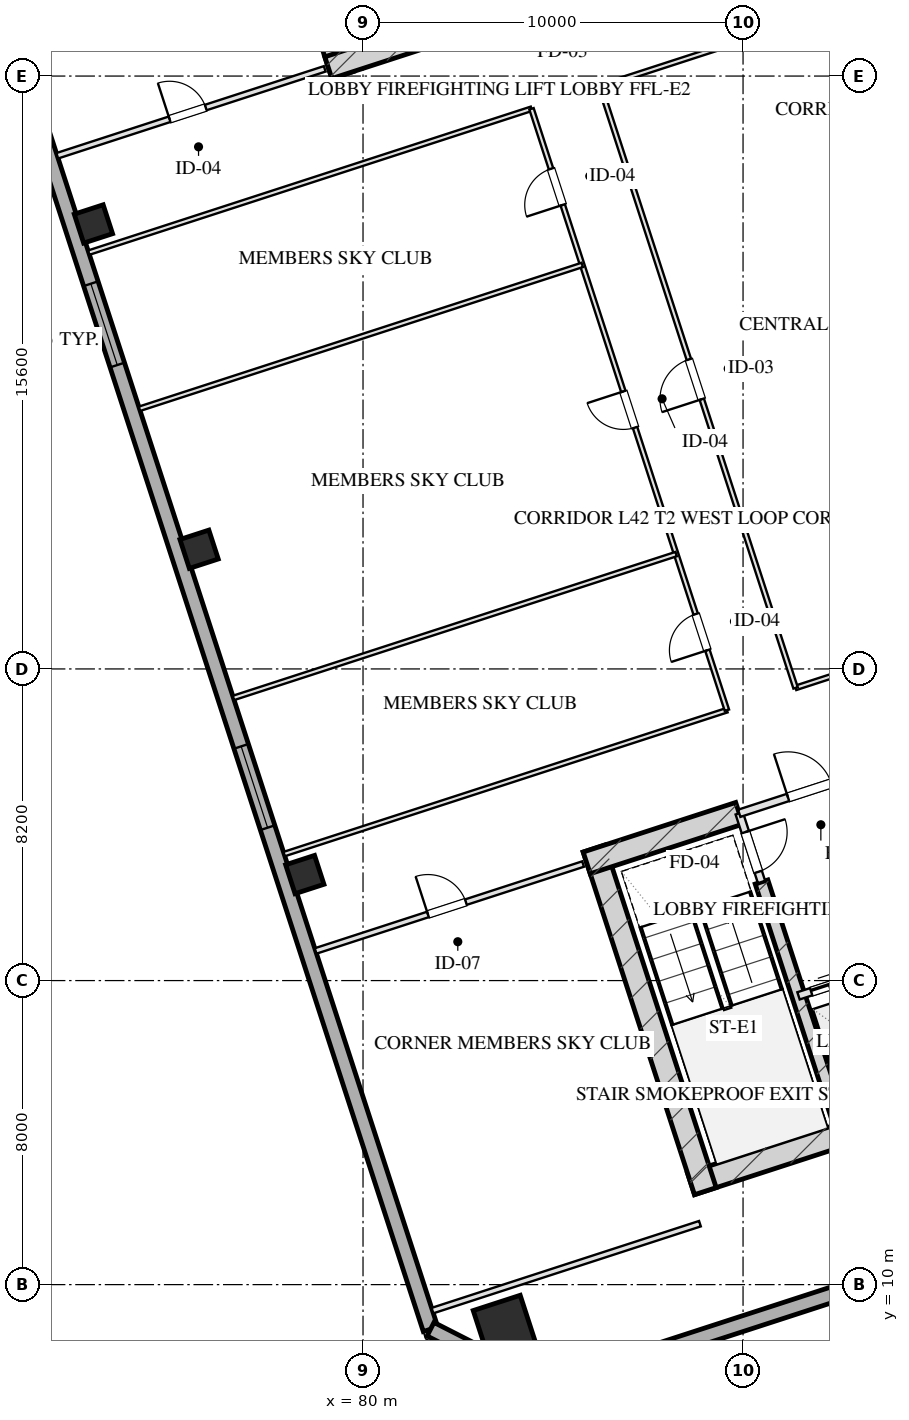
"""IFC4 building model, lengths in metres.
Left out: names, types, materials, properties, quantities, classifications, styles, units other than length and angle.
Written with IfcOpenShell. Run it as: python <this file> out.ifc"""

import sys

from ifc_helpers import new_model, si_unit, direction, frame, frame_2d, origin, origin_2d, place, context, subcontext, project, spatial, rectangle, hollow_rectangle, extrude, element, fill, save


model = new_model("IFC4")
c1 = context("Model", 3, precision=1e-05, world=origin(), true_north=direction((0.0, 1.0)))
c2 = subcontext(c1, "Body", "Model", "MODEL_VIEW")
j1 = project(units=[si_unit("LENGTHUNIT", "METRE"), si_unit("PLANEANGLEUNIT", "RADIAN")], contexts=[c1])
p1 = place(None, origin())
s1 = spatial("IfcSite", under=j1, at=p1, CompositionType="ELEMENT")
p2 = place(p1, origin())
s2 = spatial("IfcBuilding", under=s1, at=p2, CompositionType="ELEMENT")
p3 = place(p2, frame((0.0, 0.0, 159.85)))
s3 = spatial("IfcBuildingStorey", under=s2, at=p3, CompositionType="ELEMENT", Elevation=159.85)
p4 = place(p3, frame((88.63, 12.652, 0.0), z_axis=(0.0, 0.0, 1.0), x_axis=(0.95105714907, 0.309015046886, 0.0)))
e1 = element("IfcWall", 1, at=p4, inside=s3, PredefinedType="SHEAR", context=c2, shape_type="SweptSolid", body=[
    extrude(rectangle(XDim=16.4, YDim=0.6, at=frame_2d((8.2, 0.0))), origin(), (0.0, 0.0, 1.0), 3.45),
])
p5 = place(p3, frame((86.078, 21.475, 0.0), z_axis=(0.0, 0.0, 1.0), x_axis=(0.309017938678, -0.951056209472, 0.0)))
e2 = element("IfcWall", 2, at=p5, inside=s3, PredefinedType="SHEAR", context=c2, shape_type="SweptSolid", body=[
    extrude(rectangle(XDim=9.48, YDim=0.6, at=frame_2d((4.74, 0.0))), origin(), (0.0, 0.0, 1.0), 3.45),
])
p6 = place(p3, frame((90.486, 20.594, 0.0), z_axis=(0.0, 0.0, 1.0), x_axis=(0.309020428229, -0.951055400562, 0.0)))
e3 = element("IfcWall", 3, at=p6, inside=s3, PredefinedType="SHEAR", context=c2, shape_type="SweptSolid", body=[
    extrude(rectangle(XDim=6.98, YDim=0.35, at=frame_2d((3.49, 0.0))), origin(), (0.0, 0.0, 1.0), 3.45),
])
p7 = place(p3, frame((85.886, 21.097, 0.0), z_axis=(0.0, 0.0, 1.0), x_axis=(0.951068073652, 0.308981422225, 0.0)))
e4 = element("IfcWall", 4, at=p7, inside=s3, PredefinedType="SHEAR", context=c2, shape_type="SweptSolid", body=[
    extrude(rectangle(XDim=4.22, YDim=0.6, at=frame_2d((2.11, 0.0))), origin(), (0.0, 0.0, 1.0), 3.45),
])
p8 = place(p3, frame((79.466, 41.828, 0.0), z_axis=(0.0, 0.0, 1.0), x_axis=(-0.309041232772, 0.951048640421, 0.0)))
e5 = element("IfcWall", 5, at=p8, inside=s3, PredefinedType="SHEAR", context=c2, shape_type="SweptSolid", body=[
    extrude(rectangle(XDim=9.48, YDim=0.6, at=frame_2d((4.74, 0.0))), origin(), (0.0, 0.0, 1.0), 3.45),
])
p9 = place(p3, frame((79.087, 42.021, 0.0), z_axis=(0.0, 0.0, 1.0), x_axis=(0.951062550203, 0.3089984233, 0.0)))
e6 = element("IfcWall", 6, at=p9, inside=s3, PredefinedType="SHEAR", context=c2, shape_type="SweptSolid", body=[
    extrude(rectangle(XDim=4.22, YDim=0.6, at=frame_2d((2.11, 0.0))), origin(), (0.0, 0.0, 1.0), 3.45),
])
p10 = place(p3, frame((83.719, 8.901, 0.0), z_axis=(0.0, 0.0, 1.0), x_axis=(0.951056516295, 0.309016994375, 0.0)))
e7 = element("IfcColumn", 7, at=p10, inside=s3, PredefinedType="COLUMN", context=c2, shape_type="SweptSolid", body=[
    extrude(hollow_rectangle(XDim=1.3, YDim=1.3, WallThickness=0.045, at=origin_2d()), origin(), (0.0, 0.0, 1.0), 3.451),
])
for number, where, z_axis, x_axis in (
    (8, (78.468, 20.79, 0.0), (0.0, 0.0, 1.0), (0.951, 0.309, 0.0)),
    (9, (75.687, 29.349, 0.0), (0.0, 0.0, 1.0), (0.951, 0.309, 0.0)),
    (10, (72.906, 37.909, 0.0), (0.0, 0.0, 1.0), (0.951, 0.309, 0.0)),
):
    element("IfcColumn", number, at=place(p3, frame(where, z_axis=z_axis, x_axis=x_axis)), inside=s3, PredefinedType="COLUMN", context=c2, shape_type="SweptSolid", body=[
        extrude(hollow_rectangle(XDim=0.8, YDim=0.8, WallThickness=0.028, at=origin_2d()), origin(), (0.0, 0.0, 1.0), 3.451),
    ])
p11 = place(p3, frame((81.776, 8.827, 0.0), z_axis=(0.0, 0.0, 1.0), x_axis=(-0.309014228706, 0.951057414911, 0.0)))
e11 = element("IfcWall", 11, at=p11, inside=s3, PredefinedType="SOLIDWALL", context=c2, shape_type="SweptSolid", body=[
    extrude(rectangle(XDim=42.8, YDim=0.4, at=frame_2d((21.4, 0.0))), origin(), (0.0, 0.0, 1.0), 2.61),
])
p12 = place(p11, frame((13.875, 0.0, 0.75)))
e12 = element("IfcOpeningElement", 12, at=p12, cuts=e11, PredefinedType="OPENING", context=c2, shape_type="SweptSolid", body=[
    extrude(rectangle(XDim=2.25, YDim=1.46, at=frame_2d((1.125, 0.73))), frame((0.0, 0.21, 0.0), z_axis=(0.0, -1.0, 0.0), x_axis=(1.0, 0.0, 0.0)), (0.0, 0.0, 1.0), 0.42),
])
p13 = place(p11, frame((26.675, 0.0, 0.75)))
e13 = element("IfcOpeningElement", 13, at=p13, cuts=e11, PredefinedType="OPENING", context=c2, shape_type="SweptSolid", body=[
    extrude(rectangle(XDim=2.25, YDim=1.46, at=frame_2d((1.125, 0.73))), frame((0.0, 0.21, 0.0), z_axis=(0.0, -1.0, 0.0), x_axis=(1.0, 0.0, 0.0)), (0.0, 0.0, 1.0), 0.42),
])
p14 = place(p3, frame((109.908, 15.444, 0.0), z_axis=(0.0, 0.0, 1.0), x_axis=(-0.951057580055, -0.30901372044, 0.0)))
e14 = element("IfcWall", 14, at=p14, inside=s3, PredefinedType="SOLIDWALL", context=c2, shape_type="SweptSolid", body=[
    extrude(rectangle(XDim=26.4, YDim=0.4, at=frame_2d((13.2, 0.0))), origin(), (0.0, 0.0, 1.0), 2.61),
])
p15 = place(p3, frame((84.801, 7.286, 0.0), z_axis=(0.0, 0.0, 1.0), x_axis=(-0.891020832027, 0.453962417932, 0.0)))
e15 = element("IfcWall", 15, at=p15, inside=s3, PredefinedType="SOLIDWALL", context=c2, shape_type="SweptSolid", body=[
    extrude(rectangle(XDim=3.394, YDim=0.4, at=frame_2d((1.697, 0.0))), origin(), (0.0, 0.0, 1.0), 2.61),
])
p16 = place(p3, frame((89.899, 22.401, 0.0), z_axis=(0.0, 0.0, 1.0), x_axis=(0.308932062672, -0.951084108086, 0.0)))
e16 = element("IfcWall", 16, at=p16, inside=s3, PredefinedType="PARTITIONING", context=c2, shape_type="SweptSolid", body=[
    extrude(rectangle(XDim=1.9, YDim=0.2, at=frame_2d((0.95, 0.0))), origin(), (0.0, 0.0, 1.0), 3.175),
])
p17 = place(p16, frame((0.52, 0.0, 0.0)))
e17 = element("IfcOpeningElement", 17, at=p17, cuts=e16, PredefinedType="OPENING", context=c2, shape_type="SweptSolid", body=[
    extrude(rectangle(XDim=1.1, YDim=2.05, at=frame_2d((0.55, 1.025))), frame((0.0, 0.11, 0.0), z_axis=(0.0, -1.0, 0.0), x_axis=(1.0, 0.0, 0.0)), (0.0, 0.0, 1.0), 0.22),
])
p18 = place(p3, frame((89.899, 22.401, 0.0), z_axis=(0.0, 0.0, 1.0), x_axis=(0.951046716504, 0.309047153403, 0.0)))
e18 = element("IfcWall", 18, at=p18, inside=s3, PredefinedType="PARTITIONING", context=c2, shape_type="SweptSolid", body=[
    extrude(rectangle(XDim=3.83, YDim=0.2, at=frame_2d((1.915, 0.0))), origin(), (0.0, 0.0, 1.0), 3.175),
])
p19 = place(p18, frame((1.35, 0.0, 0.0)))
e19 = element("IfcOpeningElement", 19, at=p19, cuts=e18, PredefinedType="OPENING", context=c2, shape_type="SweptSolid", body=[
    extrude(rectangle(XDim=1.2, YDim=2.05, at=frame_2d((0.6, 1.025))), frame((0.0, 0.11, 0.0), z_axis=(0.0, -1.0, 0.0), x_axis=(1.0, 0.0, 0.0)), (0.0, 0.0, 1.0), 0.22),
])
p20 = place(p3, frame((91.46, 17.598, 0.0), z_axis=(0.0, 0.0, 1.0), x_axis=(0.951062257173, 0.308999325213, 0.0)))
e20 = element("IfcWall", 20, at=p20, inside=s3, PredefinedType="PARTITIONING", context=c2, shape_type="SweptSolid", body=[
    extrude(rectangle(XDim=2.1, YDim=0.2, at=frame_2d((1.05, 0.0))), origin(), (0.0, 0.0, 1.0), 3.175),
])
p21 = place(p20, frame((0.35, 0.0, 0.0)))
e21 = element("IfcOpeningElement", 21, at=p21, cuts=e20, PredefinedType="OPENING", context=c2, shape_type="SweptSolid", body=[
    extrude(rectangle(XDim=1.1, YDim=2.05, at=frame_2d((0.55, 1.025))), frame((0.0, 0.11, 0.0), z_axis=(0.0, -1.0, 0.0), x_axis=(1.0, 0.0, 0.0)), (0.0, 0.0, 1.0), 0.22),
])
p22 = place(p3, frame((81.828, 9.316, 0.0), z_axis=(0.0, 0.0, 1.0), x_axis=(0.95105128112, 0.309033106124, 0.0)))
e22 = element("IfcWall", 22, at=p22, inside=s3, PredefinedType="PARTITIONING", context=c2, shape_type="SweptSolid", body=[
    extrude(rectangle(XDim=7.4, YDim=0.15, at=frame_2d((3.7, 0.0))), origin(), (0.0, 0.0, 1.0), 3.175),
])
p23 = place(p3, frame((78.753, 18.78, 0.0), z_axis=(0.0, 0.0, 1.0), x_axis=(0.951060977215, 0.309003264738, 0.0)))
e23 = element("IfcWall", 23, at=p23, inside=s3, PredefinedType="PARTITIONING", context=c2, shape_type="SweptSolid", body=[
    extrude(rectangle(XDim=7.4, YDim=0.15, at=frame_2d((3.7, 0.0))), origin(), (0.0, 0.0, 1.0), 3.175),
])
p24 = place(p23, frame((3.108, 0.0, 0.0)))
e24 = element("IfcOpeningElement", 24, at=p24, cuts=e23, PredefinedType="OPENING", context=c2, shape_type="SweptSolid", body=[
    extrude(rectangle(XDim=1.05, YDim=2.05, at=frame_2d((0.525, 1.025))), frame((0.0, 0.085, 0.0), z_axis=(0.0, -1.0, 0.0), x_axis=(1.0, 0.0, 0.0)), (0.0, 0.0, 1.0), 0.17),
])
p25 = place(p3, frame((71.955, 39.703, 0.0), z_axis=(0.0, 0.0, 1.0), x_axis=(0.951060977215, 0.309003264738, 0.0)))
e25 = element("IfcWall", 25, at=p25, inside=s3, PredefinedType="PARTITIONING", context=c2, shape_type="SweptSolid", body=[
    extrude(rectangle(XDim=7.4, YDim=0.15, at=frame_2d((3.7, 0.0))), origin(), (0.0, 0.0, 1.0), 3.175),
])
p26 = place(p25, frame((3.108, 0.0, 0.0)))
e26 = element("IfcOpeningElement", 26, at=p26, cuts=e25, PredefinedType="OPENING", context=c2, shape_type="SweptSolid", body=[
    extrude(rectangle(XDim=1.0, YDim=2.05, at=frame_2d((0.5, 1.025))), frame((0.0, 0.085, 0.0), z_axis=(0.0, -1.0, 0.0), x_axis=(1.0, 0.0, 0.0)), (0.0, 0.0, 1.0), 0.17),
])
p27 = place(p3, frame((77.925, 21.328, 0.0), z_axis=(0.0, 0.0, 1.0), x_axis=(0.95105749975, 0.309013967595, 0.0)))
e27 = element("IfcWall", 27, at=p27, inside=s3, PredefinedType="PARTITIONING", context=c2, shape_type="SweptSolid", body=[
    extrude(rectangle(XDim=12.25, YDim=0.12, at=frame_2d((6.125, 0.0))), origin(), (0.0, 0.0, 1.0), 3.175),
])
p28 = place(p3, frame((91.382, 25.701, 0.0), z_axis=(0.0, 0.0, 1.0), x_axis=(0.951061683147, 0.309001091988, 0.0)))
e28 = element("IfcWall", 28, at=p28, inside=s3, PredefinedType="PARTITIONING", context=c2, shape_type="SweptSolid", body=[
    extrude(rectangle(XDim=8.25, YDim=0.12, at=frame_2d((4.125, 0.0))), origin(), (0.0, 0.0, 1.0), 3.175),
])
p29 = place(p3, frame((72.783, 37.154, 0.0), z_axis=(0.0, 0.0, 1.0), x_axis=(0.9510516424, 0.30903199428, 0.0)))
e29 = element("IfcWall", 29, at=p29, inside=s3, PredefinedType="PARTITIONING", context=c2, shape_type="SweptSolid", body=[
    extrude(rectangle(XDim=12.25, YDim=0.12, at=frame_2d((6.125, 0.0))), origin(), (0.0, 0.0, 1.0), 3.175),
])
p30 = place(p3, frame((86.24, 41.527, 0.0), z_axis=(0.0, 0.0, 1.0), x_axis=(0.951058857521, 0.309009788731, 0.0)))
e30 = element("IfcWall", 30, at=p30, inside=s3, PredefinedType="PARTITIONING", context=c2, shape_type="SweptSolid", body=[
    extrude(rectangle(XDim=8.25, YDim=0.12, at=frame_2d((4.125, 0.0))), origin(), (0.0, 0.0, 1.0), 3.175),
])
p31 = place(p3, frame((89.575, 25.114, 0.0), z_axis=(0.0, 0.0, 1.0), x_axis=(-0.30901773025, 0.951056277195, 0.0)))
e31 = element("IfcWall", 31, at=p31, inside=s3, PredefinedType="PARTITIONING", context=c2, shape_type="SweptSolid", body=[
    extrude(rectangle(XDim=16.64, YDim=0.12, at=frame_2d((8.32, 0.0))), origin(), (0.0, 0.0, 1.0), 3.175),
])
p32 = place(p31, frame((1.66, 0.0, 0.0)))
e32 = element("IfcOpeningElement", 32, at=p32, cuts=e31, PredefinedType="OPENING", context=c2, shape_type="SweptSolid", body=[
    extrude(rectangle(XDim=1.0, YDim=2.05, at=frame_2d((0.5, 1.025))), frame((0.0, 0.07, 0.0), z_axis=(0.0, -1.0, 0.0), x_axis=(1.0, 0.0, 0.0)), (0.0, 0.0, 1.0), 0.14),
])
p33 = place(p31, frame((7.82, 0.0, 0.0)))
e33 = element("IfcOpeningElement", 33, at=p33, cuts=e31, PredefinedType="OPENING", context=c2, shape_type="SweptSolid", body=[
    extrude(rectangle(XDim=1.0, YDim=2.05, at=frame_2d((0.5, 1.025))), frame((0.0, 0.07, 0.0), z_axis=(0.0, -1.0, 0.0), x_axis=(1.0, 0.0, 0.0)), (0.0, 0.0, 1.0), 0.14),
])
p34 = place(p31, frame((13.98, 0.0, 0.0)))
e34 = element("IfcOpeningElement", 34, at=p34, cuts=e31, PredefinedType="OPENING", context=c2, shape_type="SweptSolid", body=[
    extrude(rectangle(XDim=1.0, YDim=2.05, at=frame_2d((0.5, 1.025))), frame((0.0, 0.07, 0.0), z_axis=(0.0, -1.0, 0.0), x_axis=(1.0, 0.0, 0.0)), (0.0, 0.0, 1.0), 0.14),
])
p35 = place(p3, frame((91.382, 25.701, 0.0), z_axis=(0.0, 0.0, 1.0), x_axis=(-0.309004459387, 0.951060589068, 0.0)))
e35 = element("IfcWall", 35, at=p35, inside=s3, PredefinedType="PARTITIONING", context=c2, shape_type="SweptSolid", body=[
    extrude(rectangle(XDim=16.64, YDim=0.12, at=frame_2d((8.32, 0.0))), origin(), (0.0, 0.0, 1.0), 3.175),
])
p36 = place(p35, frame((7.987, 0.0, 0.0)))
e36 = element("IfcOpeningElement", 36, at=p36, cuts=e35, PredefinedType="OPENING", context=c2, shape_type="SweptSolid", body=[
    extrude(rectangle(XDim=1.1, YDim=2.05, at=frame_2d((0.55, 1.025))), frame((0.0, 0.07, 0.0), z_axis=(0.0, -1.0, 0.0), x_axis=(1.0, 0.0, 0.0)), (0.0, 0.0, 1.0), 0.14),
])
for number, where, z_axis, x_axis in (
    (37, (76.59, 25.437, 0.0), (0.0, 0.0, 1.0), (0.951, 0.309, 0.0)),
    (38, (74.118, 33.045, 0.0), (0.0, 0.0, 1.0), (0.951, 0.309, 0.0)),
):
    element("IfcWall", number, at=place(p3, frame(where, z_axis=z_axis, x_axis=x_axis)), inside=s3, PredefinedType="PARTITIONING", context=c2, shape_type="SweptSolid", body=[
        extrude(rectangle(XDim=12.25, YDim=0.12, at=frame_2d((6.125, 0.0))), origin(), (0.0, 0.0, 1.0), 3.175),
    ])
p37 = place(p12, origin())
e39 = element("IfcWindow", 39, at=p37, inside=s3, PartitioningType="TRIPLE_PANEL_VERTICAL", PredefinedType="WINDOW", context=c2, shape_type="SweptSolid", body=[
    extrude(rectangle(XDim=2.25, YDim=1.46, at=frame_2d((1.125, 0.73))), frame((0.0, 0.03, 0.0), z_axis=(0.0, -1.0, 0.0), x_axis=(1.0, 0.0, 0.0)), (0.0, 0.0, 1.0), 0.06),
])
fill(e12, e39)
p38 = place(p13, origin())
e40 = element("IfcWindow", 40, at=p38, inside=s3, PartitioningType="TRIPLE_PANEL_VERTICAL", PredefinedType="WINDOW", context=c2, shape_type="SweptSolid", body=[
    extrude(rectangle(XDim=2.25, YDim=1.46, at=frame_2d((1.125, 0.73))), frame((0.0, 0.03, 0.0), z_axis=(0.0, -1.0, 0.0), x_axis=(1.0, 0.0, 0.0)), (0.0, 0.0, 1.0), 0.06),
])
fill(e13, e40)
p39 = place(p17, origin())
e41 = element("IfcDoor", 41, at=p39, inside=s3, OperationType="SINGLE_SWING_LEFT", PredefinedType="DOOR", context=c2, shape_type="SweptSolid", body=[
    extrude(rectangle(XDim=1.1, YDim=2.05, at=frame_2d((0.55, 1.025))), frame((0.0, 0.025, 0.0), z_axis=(0.0, -1.0, 0.0), x_axis=(1.0, 0.0, 0.0)), (0.0, 0.0, 1.0), 0.05),
])
fill(e17, e41)
p40 = place(p19, origin())
e42 = element("IfcDoor", 42, at=p40, inside=s3, OperationType="SINGLE_SWING_LEFT", PredefinedType="DOOR", context=c2, shape_type="SweptSolid", body=[
    extrude(rectangle(XDim=1.2, YDim=2.05, at=frame_2d((0.6, 1.025))), frame((0.0, 0.025, 0.0), z_axis=(0.0, -1.0, 0.0), x_axis=(1.0, 0.0, 0.0)), (0.0, 0.0, 1.0), 0.05),
])
fill(e19, e42)
p41 = place(p21, origin())
e43 = element("IfcDoor", 43, at=p41, inside=s3, OperationType="DOUBLE_DOOR_SLIDING", PredefinedType="DOOR", context=c2, shape_type="SweptSolid", body=[
    extrude(rectangle(XDim=1.1, YDim=2.05, at=frame_2d((0.55, 1.025))), frame((0.0, 0.025, 0.0), z_axis=(0.0, -1.0, 0.0), x_axis=(1.0, 0.0, 0.0)), (0.0, 0.0, 1.0), 0.05),
])
fill(e21, e43)
p42 = place(p24, origin())
e44 = element("IfcDoor", 44, at=p42, inside=s3, OperationType="SINGLE_SWING_LEFT", PredefinedType="DOOR", context=c2, shape_type="SweptSolid", body=[
    extrude(rectangle(XDim=1.05, YDim=2.05, at=frame_2d((0.525, 1.025))), frame((0.0, 0.025, 0.0), z_axis=(0.0, -1.0, 0.0), x_axis=(1.0, 0.0, 0.0)), (0.0, 0.0, 1.0), 0.05),
])
fill(e24, e44)
p43 = place(p26, origin())
e45 = element("IfcDoor", 45, at=p43, inside=s3, OperationType="SINGLE_SWING_LEFT", PredefinedType="DOOR", context=c2, shape_type="SweptSolid", body=[
    extrude(rectangle(XDim=1.0, YDim=2.05, at=frame_2d((0.5, 1.025))), frame((0.0, 0.025, 0.0), z_axis=(0.0, -1.0, 0.0), x_axis=(1.0, 0.0, 0.0)), (0.0, 0.0, 1.0), 0.05),
])
fill(e26, e45)
p44 = place(p32, origin())
e46 = element("IfcDoor", 46, at=p44, inside=s3, OperationType="SINGLE_SWING_LEFT", PredefinedType="DOOR", context=c2, shape_type="SweptSolid", body=[
    extrude(rectangle(XDim=1.0, YDim=2.05, at=frame_2d((0.5, 1.025))), frame((0.0, 0.025, 0.0), z_axis=(0.0, -1.0, 0.0), x_axis=(1.0, 0.0, 0.0)), (0.0, 0.0, 1.0), 0.05),
])
fill(e32, e46)
p45 = place(p33, origin())
e47 = element("IfcDoor", 47, at=p45, inside=s3, OperationType="SINGLE_SWING_RIGHT", PredefinedType="DOOR", context=c2, shape_type="SweptSolid", body=[
    extrude(rectangle(XDim=1.0, YDim=2.05, at=frame_2d((0.5, 1.025))), frame((0.0, 0.025, 0.0), z_axis=(0.0, -1.0, 0.0), x_axis=(1.0, 0.0, 0.0)), (0.0, 0.0, 1.0), 0.05),
])
fill(e33, e47)
p46 = place(p34, origin())
e48 = element("IfcDoor", 48, at=p46, inside=s3, OperationType="SINGLE_SWING_LEFT", PredefinedType="DOOR", context=c2, shape_type="SweptSolid", body=[
    extrude(rectangle(XDim=1.0, YDim=2.05, at=frame_2d((0.5, 1.025))), frame((0.0, 0.025, 0.0), z_axis=(0.0, -1.0, 0.0), x_axis=(1.0, 0.0, 0.0)), (0.0, 0.0, 1.0), 0.05),
])
fill(e34, e48)
p47 = place(p36, origin())
e49 = element("IfcDoor", 49, at=p47, inside=s3, OperationType="SINGLE_SWING_LEFT", PredefinedType="DOOR", context=c2, shape_type="SweptSolid", body=[
    extrude(rectangle(XDim=1.1, YDim=2.05, at=frame_2d((0.55, 1.025))), frame((0.0, 0.025, 0.0), z_axis=(0.0, -1.0, 0.0), x_axis=(1.0, 0.0, 0.0)), (0.0, 0.0, 1.0), 0.05),
])
fill(e36, e49)
save(model, sys.argv[1])
